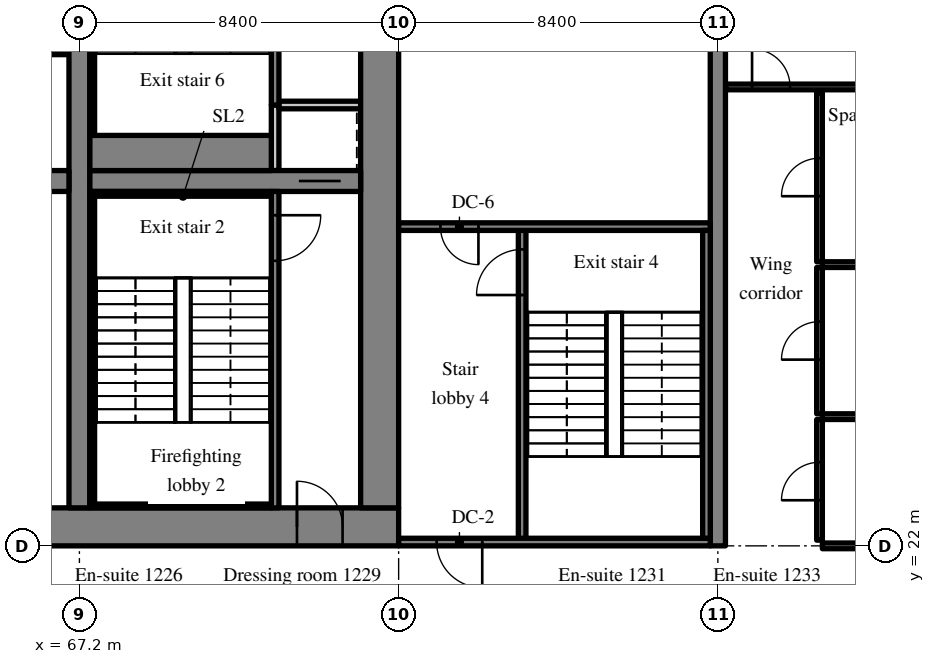
"""IFC4 building model, lengths in metres.
Left out: names, types, materials, properties, quantities, classifications, styles, units other than length and angle.
Written with IfcOpenShell. Run it as: python <this file> out.ifc"""

import sys

from ifc_helpers import new_model, si_unit, direction, frame, frame_2d, origin, place, context, subcontext, project, spatial, rectangle, extrude, source, transform, mapped, element, fill, save


model = new_model("IFC4")
c1 = context("Model", 3, precision=1e-05, world=origin(), true_north=direction((0.0, 1.0)))
c2 = subcontext(c1, "Body", "Model", "MODEL_VIEW")
j1 = project(units=[si_unit("LENGTHUNIT", "METRE"), si_unit("PLANEANGLEUNIT", "RADIAN")], contexts=[c1])
p1 = place(None, origin())
s1 = spatial("IfcSite", under=j1, at=p1, CompositionType="ELEMENT")
p2 = place(p1, origin())
s2 = spatial("IfcBuilding", under=s1, at=p2, CompositionType="ELEMENT")
p3 = place(p2, frame((0.0, 0.0, 54.4)))
s3 = spatial("IfcBuildingStorey", under=s2, at=p3, CompositionType="ELEMENT", Elevation=54.4)
m1 = source(origin(), c2, "Body", "SweptSolid", [
    extrude(rectangle(XDim=50.4, YDim=1.0, at=frame_2d((25.2, 0.0))), origin(), (0.0, 0.0, 1.0), 3.52),
])
p4 = place(p3, frame((25.2, 22.5, 0.0), z_axis=(0.0, 0.0, 1.0), x_axis=(1.0, 0.0, 0.0)))
e1 = element("IfcWall", 1, at=p4, inside=s3, PredefinedType="SHEAR", context=c2, shape_type="MappedRepresentation", body=[
    mapped(m1, transform((0.0, 0.0, 0.0), scale=1.0)),
])
m2 = source(origin(), c2, "Body", "SweptSolid", [
    extrude(rectangle(XDim=1.8, YDim=2.1, at=frame_2d((0.9, 1.05))), frame((0.0, 0.51, 0.0), z_axis=(0.0, -1.0, 0.0), x_axis=(1.0, 0.0, 0.0)), (0.0, 0.0, 1.0), 1.02),
])
p5 = place(p4, frame((15.9, 0.0, 0.0)))
e2 = element("IfcOpeningElement", 2, at=p5, cuts=e1, PredefinedType="OPENING", context=c2, shape_type="MappedRepresentation", body=[
    mapped(m2, transform((0.0, 0.0, 0.0), scale=1.0)),
])
m3 = source(origin(), c2, "Body", "SweptSolid", [
    extrude(rectangle(XDim=1.2, YDim=2.1, at=frame_2d((0.6, 1.05))), frame((0.0, 0.51, 0.0), z_axis=(0.0, -1.0, 0.0), x_axis=(1.0, 0.0, 0.0)), (0.0, 0.0, 1.0), 1.02),
])
p6 = place(p4, frame((26.987, 0.0, 0.0)))
e3 = element("IfcOpeningElement", 3, at=p6, cuts=e1, PredefinedType="OPENING", context=c2, shape_type="MappedRepresentation", body=[
    mapped(m3, transform((0.0, 0.0, 0.0), scale=1.0)),
])
m4 = source(origin(), c2, "Body", "SweptSolid", [
    extrude(rectangle(XDim=0.9, YDim=2.1, at=frame_2d((0.45, 1.05))), frame((0.0, 0.51, 0.0), z_axis=(0.0, -1.0, 0.0), x_axis=(1.0, 0.0, 0.0)), (0.0, 0.0, 1.0), 1.02),
])
p7 = place(p4, frame((33.75, 0.0, 0.0)))
e4 = element("IfcOpeningElement", 4, at=p7, cuts=e1, PredefinedType="OPENING", context=c2, shape_type="MappedRepresentation", body=[
    mapped(m4, transform((0.0, 0.0, 0.0), scale=1.0)),
])
p8 = place(p4, frame((30.75, 0.0, 0.0)))
e5 = element("IfcOpeningElement", 5, at=p8, cuts=e1, PredefinedType="OPENING", context=c2, shape_type="MappedRepresentation", body=[
    mapped(m4, transform((0.0, 0.0, 0.0), scale=1.0)),
])
p9 = place(p4, frame((38.262, 0.0, 0.0)))
e6 = element("IfcOpeningElement", 6, at=p9, cuts=e1, PredefinedType="OPENING", context=c2, shape_type="MappedRepresentation", body=[
    mapped(m4, transform((0.0, 0.0, 0.0), scale=1.0)),
])
p10 = place(p4, frame((6.438, 0.0, 0.0)))
e7 = element("IfcOpeningElement", 7, at=p10, cuts=e1, PredefinedType="OPENING", context=c2, shape_type="MappedRepresentation", body=[
    mapped(m3, transform((0.0, 0.0, 0.0), scale=1.0)),
])
p11 = place(p4, frame((47.725, 0.0, 0.0)))
e8 = element("IfcOpeningElement", 8, at=p11, cuts=e1, PredefinedType="OPENING", context=c2, shape_type="MappedRepresentation", body=[
    mapped(m3, transform((0.0, 0.0, 0.0), scale=1.0)),
])
m5 = source(origin(), c2, "Body", "SweptSolid", [
    extrude(rectangle(XDim=18.0, YDim=1.0, at=frame_2d((9.0, 0.0))), origin(), (0.0, 0.0, 1.0), 3.52),
])
p12 = place(p3, frame((75.1, 23.0, 0.0), z_axis=(0.0, 0.0, 1.0), x_axis=(0.0, 1.0, 0.0)))
e9 = element("IfcWall", 9, at=p12, inside=s3, PredefinedType="SHEAR", context=c2, shape_type="MappedRepresentation", body=[
    mapped(m5, transform((0.0, 0.0, 0.0), scale=1.0)),
])
p13 = place(p12, frame((12.4, 0.0, 0.0)))
e10 = element("IfcOpeningElement", 10, at=p13, cuts=e9, PredefinedType="OPENING", context=c2, shape_type="MappedRepresentation", body=[
    mapped(m3, transform((0.0, 0.0, 0.0), scale=1.0)),
])
m6 = source(origin(), c2, "Body", "SweptSolid", [
    extrude(rectangle(XDim=18.0, YDim=0.55, at=frame_2d((9.0, 0.0))), origin(), (0.0, 0.0, 1.0), 3.52),
])
p14 = place(p3, frame((67.2, 23.0, 0.0), z_axis=(0.0, 0.0, 1.0), x_axis=(0.0, 1.0, 0.0)))
e11 = element("IfcWall", 11, at=p14, inside=s3, PredefinedType="SHEAR", context=c2, shape_type="MappedRepresentation", body=[
    mapped(m6, transform((0.0, 0.0, 0.0), scale=1.0)),
])
m7 = source(origin(), c2, "Body", "SweptSolid", [
    extrude(rectangle(XDim=16.25, YDim=0.55, at=frame_2d((8.125, 0.0))), origin(), (0.0, 0.0, 1.0), 3.52),
])
p15 = place(p3, frame((50.675, 31.6, 0.0), z_axis=(0.0, 0.0, 1.0), x_axis=(1.0, 0.0, 0.0)))
e12 = element("IfcWall", 12, at=p15, inside=s3, PredefinedType="SHEAR", context=c2, shape_type="MappedRepresentation", body=[
    mapped(m7, transform((0.0, 0.0, 0.0), scale=1.0)),
])
m8 = source(origin(), c2, "Body", "SweptSolid", [
    extrude(rectangle(XDim=1.0, YDim=2.1, at=frame_2d((0.5, 1.05))), frame((0.0, 0.285, 0.0), z_axis=(0.0, -1.0, 0.0), x_axis=(1.0, 0.0, 0.0)), (0.0, 0.0, 1.0), 0.57),
])
p16 = place(p15, frame((0.562, 0.0, 0.0)))
e13 = element("IfcOpeningElement", 13, at=p16, cuts=e12, PredefinedType="OPENING", context=c2, shape_type="MappedRepresentation", body=[
    mapped(m8, transform((0.0, 0.0, 0.0), scale=1.0)),
])
m9 = source(origin(), c2, "Body", "SweptSolid", [
    extrude(rectangle(XDim=7.125, YDim=0.55, at=frame_2d((3.562, 0.0))), origin(), (0.0, 0.0, 1.0), 3.52),
])
p17 = place(p3, frame((67.475, 31.6, 0.0), z_axis=(0.0, 0.0, 1.0), x_axis=(1.0, 0.0, 0.0)))
e14 = element("IfcWall", 14, at=p17, inside=s3, PredefinedType="SHEAR", context=c2, shape_type="MappedRepresentation", body=[
    mapped(m9, transform((0.0, 0.0, 0.0), scale=1.0)),
])
m10 = source(origin(), c2, "Body", "SweptSolid", [
    extrude(rectangle(XDim=1.1, YDim=2.1, at=frame_2d((0.55, 1.05))), frame((0.0, 0.285, 0.0), z_axis=(0.0, -1.0, 0.0), x_axis=(1.0, 0.0, 0.0)), (0.0, 0.0, 1.0), 0.57),
])
p18 = place(p17, frame((5.5, 0.0, 0.0)))
e15 = element("IfcOpeningElement", 15, at=p18, cuts=e14, PredefinedType="OPENING", context=c2, shape_type="MappedRepresentation", body=[
    mapped(m10, transform((0.0, 0.0, 0.0), scale=1.0)),
])
m11 = source(origin(), c2, "Body", "SweptSolid", [
    extrude(rectangle(XDim=20.0, YDim=0.4, at=frame_2d((10.0, 0.0))), origin(), (0.0, 0.0, 1.0), 3.52),
])
p19 = place(p3, frame((84.0, 22.0, 0.0), z_axis=(0.0, 0.0, 1.0), x_axis=(0.0, 1.0, 0.0)))
e16 = element("IfcWall", 16, at=p19, inside=s3, PredefinedType="SHEAR", context=c2, shape_type="MappedRepresentation", body=[
    mapped(m11, transform((0.0, 0.0, 0.0), scale=1.0)),
])
m12 = source(origin(), c2, "Body", "SweptSolid", [
    extrude(rectangle(XDim=14.125, YDim=0.15, at=frame_2d((7.062, 0.0))), origin(), (0.0, 0.0, 1.0), 3.52),
])
p20 = place(p3, frame((66.925, 35.0, 0.0), z_axis=(0.0, 0.0, 1.0), x_axis=(-1.0, 0.0, 0.0)))
e17 = element("IfcWall", 17, at=p20, inside=s3, PredefinedType="PARTITIONING", context=c2, shape_type="MappedRepresentation", body=[
    mapped(m12, transform((0.0, 0.0, 0.0), scale=1.0)),
])
m13 = source(origin(), c2, "Body", "SweptSolid", [
    extrude(rectangle(XDim=0.9, YDim=2.1, at=frame_2d((0.45, 1.05))), frame((0.0, 0.085, 0.0), z_axis=(0.0, -1.0, 0.0), x_axis=(1.0, 0.0, 0.0)), (0.0, 0.0, 1.0), 0.17),
])
p21 = place(p20, frame((3.414, 0.0, 0.0)))
e18 = element("IfcOpeningElement", 18, at=p21, cuts=e17, PredefinedType="OPENING", context=c2, shape_type="MappedRepresentation", body=[
    mapped(m13, transform((0.0, 0.0, 0.0), scale=1.0)),
])
p22 = place(p20, frame((10.439, 0.0, 0.0)))
e19 = element("IfcOpeningElement", 19, at=p22, cuts=e17, PredefinedType="OPENING", context=c2, shape_type="MappedRepresentation", body=[
    mapped(m13, transform((0.0, 0.0, 0.0), scale=1.0)),
])
m14 = source(origin(), c2, "Body", "SweptSolid", [
    extrude(rectangle(XDim=8.325, YDim=0.2, at=frame_2d((4.163, 0.0))), origin(), (0.0, 0.0, 1.0), 3.52),
])
p23 = place(p3, frame((72.35, 23.0, 0.0), z_axis=(0.0, 0.0, 1.0), x_axis=(0.0, 1.0, 0.0)))
e20 = element("IfcWall", 20, at=p23, inside=s3, PredefinedType="SOLIDWALL", context=c2, shape_type="MappedRepresentation", body=[
    mapped(m14, transform((0.0, 0.0, 0.0), scale=1.0)),
])
m15 = source(origin(), c2, "Body", "SweptSolid", [
    extrude(rectangle(XDim=1.2, YDim=2.1, at=frame_2d((0.6, 1.05))), frame((0.0, 0.11, 0.0), z_axis=(0.0, -1.0, 0.0), x_axis=(1.0, 0.0, 0.0)), (0.0, 0.0, 1.0), 0.22),
])
p24 = place(p23, frame((6.5, 0.0, 0.0)))
e21 = element("IfcOpeningElement", 21, at=p24, cuts=e20, PredefinedType="OPENING", context=c2, shape_type="MappedRepresentation", body=[
    mapped(m15, transform((0.0, 0.0, 0.0), scale=1.0)),
])
m16 = source(origin(), c2, "Body", "SweptSolid", [
    extrude(rectangle(XDim=1.725, YDim=0.2, at=frame_2d((0.863, 0.0))), origin(), (0.0, 0.0, 1.0), 3.52),
])
p25 = place(p3, frame((72.35, 31.875, 0.0), z_axis=(0.0, 0.0, 1.0), x_axis=(0.0, 1.0, 0.0)))
e22 = element("IfcWall", 22, at=p25, inside=s3, PredefinedType="SOLIDWALL", context=c2, shape_type="MappedRepresentation", body=[
    mapped(m16, transform((0.0, 0.0, 0.0), scale=1.0)),
])
m17 = source(origin(), c2, "Body", "SweptSolid", [
    extrude(rectangle(XDim=2.15, YDim=0.2, at=frame_2d((1.075, 0.0))), origin(), (0.0, 0.0, 1.0), 3.52),
])
p26 = place(p3, frame((72.45, 33.6, 0.0), z_axis=(0.0, 0.0, 1.0), x_axis=(1.0, 0.0, 0.0)))
e23 = element("IfcWall", 23, at=p26, inside=s3, PredefinedType="SOLIDWALL", context=c2, shape_type="MappedRepresentation", body=[
    mapped(m17, transform((0.0, 0.0, 0.0), scale=1.0)),
])
m18 = source(origin(), c2, "Body", "SweptSolid", [
    extrude(rectangle(XDim=7.4, YDim=0.2, at=frame_2d((3.7, 0.0))), origin(), (0.0, 0.0, 1.0), 3.52),
])
p27 = place(p3, frame((72.35, 33.6, 0.0), z_axis=(0.0, 0.0, 1.0), x_axis=(0.0, 1.0, 0.0)))
e24 = element("IfcWall", 24, at=p27, inside=s3, PredefinedType="SOLIDWALL", context=c2, shape_type="MappedRepresentation", body=[
    mapped(m18, transform((0.0, 0.0, 0.0), scale=1.0)),
])
m19 = source(origin(), c2, "Body", "SweptSolid", [
    extrude(rectangle(XDim=1.8, YDim=2.1, at=frame_2d((0.9, 1.05))), frame((0.0, 0.11, 0.0), z_axis=(0.0, -1.0, 0.0), x_axis=(1.0, 0.0, 0.0)), (0.0, 0.0, 1.0), 0.22),
])
p28 = place(p27, frame((5.3, 0.0, 0.0)))
e25 = element("IfcOpeningElement", 25, at=p28, cuts=e24, PredefinedType="OPENING", context=c2, shape_type="MappedRepresentation", body=[
    mapped(m19, transform((0.0, 0.0, 0.0), scale=1.0)),
])
m20 = source(origin(), c2, "Body", "SweptSolid", [
    extrude(rectangle(XDim=8.3, YDim=0.2, at=frame_2d((4.15, 0.0))), origin(), (0.0, 0.0, 1.0), 3.52),
])
p29 = place(p3, frame((78.85, 22.1, 0.0), z_axis=(0.0, 0.0, 1.0), x_axis=(0.0, 1.0, 0.0)))
e26 = element("IfcWall", 26, at=p29, inside=s3, PredefinedType="SOLIDWALL", context=c2, shape_type="MappedRepresentation", body=[
    mapped(m20, transform((0.0, 0.0, 0.0), scale=1.0)),
])
p30 = place(p29, frame((6.5, 0.0, 0.0)))
e27 = element("IfcOpeningElement", 27, at=p30, cuts=e26, PredefinedType="OPENING", context=c2, shape_type="MappedRepresentation", body=[
    mapped(m15, transform((0.0, 0.0, 0.0), scale=1.0)),
])
m21 = source(origin(), c2, "Body", "SweptSolid", [
    extrude(rectangle(XDim=8.2, YDim=0.2, at=frame_2d((4.1, 0.0))), origin(), (0.0, 0.0, 1.0), 3.52),
])
p31 = place(p3, frame((83.8, 22.1, 0.0), z_axis=(0.0, 0.0, 1.0), x_axis=(-1.0, 0.0, 0.0)))
e28 = element("IfcWall", 28, at=p31, inside=s3, PredefinedType="SOLIDWALL", context=c2, shape_type="MappedRepresentation", body=[
    mapped(m21, transform((0.0, 0.0, 0.0), scale=1.0)),
])
p32 = place(p31, frame((6.0, 0.0, 0.0)))
e29 = element("IfcOpeningElement", 29, at=p32, cuts=e28, PredefinedType="OPENING", context=c2, shape_type="MappedRepresentation", body=[
    mapped(m15, transform((0.0, 0.0, 0.0), scale=1.0)),
])
p33 = place(p3, frame((83.8, 30.4, 0.0), z_axis=(0.0, 0.0, 1.0), x_axis=(-1.0, 0.0, 0.0)))
e30 = element("IfcWall", 30, at=p33, inside=s3, PredefinedType="SOLIDWALL", context=c2, shape_type="MappedRepresentation", body=[
    mapped(m21, transform((0.0, 0.0, 0.0), scale=1.0)),
])
m22 = source(origin(), c2, "Body", "SweptSolid", [
    extrude(rectangle(XDim=1.0, YDim=2.1, at=frame_2d((0.5, 1.05))), frame((0.0, 0.11, 0.0), z_axis=(0.0, -1.0, 0.0), x_axis=(1.0, 0.0, 0.0)), (0.0, 0.0, 1.0), 0.22),
])
p34 = place(p33, frame((6.1, 0.0, 0.0)))
e31 = element("IfcOpeningElement", 31, at=p34, cuts=e30, PredefinedType="OPENING", context=c2, shape_type="MappedRepresentation", body=[
    mapped(m22, transform((0.0, 0.0, 0.0), scale=1.0)),
])
m23 = source(origin(), c2, "Body", "SweptSolid", [
    extrude(rectangle(XDim=4.775, YDim=0.1, at=frame_2d((2.387, 0.0))), origin(), (0.0, 0.0, 1.0), 3.52),
])
p35 = place(p3, frame((67.475, 23.05, 0.0), z_axis=(0.0, 0.0, 1.0), x_axis=(1.0, 0.0, 0.0)))
e32 = element("IfcWall", 32, at=p35, inside=s3, PredefinedType="SOLIDWALL", context=c2, shape_type="MappedRepresentation", body=[
    mapped(m23, transform((0.0, 0.0, 0.0), scale=1.0)),
])
m24 = source(origin(), c2, "Body", "SweptSolid", [
    extrude(rectangle(XDim=4.775, YDim=0.125, at=frame_2d((2.387, 0.0))), origin(), (0.0, 0.0, 1.0), 3.52),
])
p36 = place(p3, frame((67.475, 31.262, 0.0), z_axis=(0.0, 0.0, 1.0), x_axis=(1.0, 0.0, 0.0)))
e33 = element("IfcWall", 33, at=p36, inside=s3, PredefinedType="SOLIDWALL", context=c2, shape_type="MappedRepresentation", body=[
    mapped(m24, transform((0.0, 0.0, 0.0), scale=1.0)),
])
m25 = source(origin(), c2, "Body", "SweptSolid", [
    extrude(rectangle(XDim=8.1, YDim=0.125, at=frame_2d((4.05, 0.0))), origin(), (0.0, 0.0, 1.0), 3.52),
])
p37 = place(p3, frame((67.537, 23.1, 0.0), z_axis=(0.0, 0.0, 1.0), x_axis=(0.0, 1.0, 0.0)))
e34 = element("IfcWall", 34, at=p37, inside=s3, PredefinedType="SOLIDWALL", context=c2, shape_type="MappedRepresentation", body=[
    mapped(m25, transform((0.0, 0.0, 0.0), scale=1.0)),
])
m26 = source(origin(), c2, "Body", "SweptSolid", [
    extrude(rectangle(XDim=4.775, YDim=0.925, at=frame_2d((2.387, 0.0))), origin(), (0.0, 0.0, 1.0), 3.52),
])
p38 = place(p3, frame((67.475, 32.337, 0.0), z_axis=(0.0, 0.0, 1.0), x_axis=(1.0, 0.0, 0.0)))
e35 = element("IfcWall", 35, at=p38, inside=s3, PredefinedType="SOLIDWALL", context=c2, shape_type="MappedRepresentation", body=[
    mapped(m26, transform((0.0, 0.0, 0.0), scale=1.0)),
])
p39 = place(p3, frame((67.537, 32.8, 0.0), z_axis=(0.0, 0.0, 1.0), x_axis=(0.0, 1.0, 0.0)))
e36 = element("IfcWall", 36, at=p39, inside=s3, PredefinedType="SOLIDWALL", context=c2, shape_type="MappedRepresentation", body=[
    mapped(m25, transform((0.0, 0.0, 0.0), scale=1.0)),
])
m27 = source(origin(), c2, "Body", "SweptSolid", [
    extrude(rectangle(XDim=8.1, YDim=0.2, at=frame_2d((4.05, 0.0))), origin(), (0.0, 0.0, 1.0), 3.52),
])
p40 = place(p3, frame((83.7, 22.2, 0.0), z_axis=(0.0, 0.0, 1.0), x_axis=(0.0, 1.0, 0.0)))
e37 = element("IfcWall", 37, at=p40, inside=s3, PredefinedType="SOLIDWALL", context=c2, shape_type="MappedRepresentation", body=[
    mapped(m27, transform((0.0, 0.0, 0.0), scale=1.0)),
])
m28 = source(origin(), c2, "Body", "SweptSolid", [
    extrude(rectangle(XDim=5.45, YDim=0.15, at=frame_2d((2.725, 0.0))), origin(), (0.0, 0.0, 1.0), 2.82),
])
p41 = place(p3, frame((86.75, 22.0, 0.0), z_axis=(0.0, 0.0, 1.0), x_axis=(1.0, 0.0, 0.0)))
e38 = element("IfcWall", 38, at=p41, inside=s3, PredefinedType="PARTITIONING", context=c2, shape_type="MappedRepresentation", body=[
    mapped(m28, transform((0.0, 0.0, 0.0), scale=1.0)),
])
m29 = source(origin(), c2, "Body", "SweptSolid", [
    extrude(rectangle(XDim=3.175, YDim=0.15, at=frame_2d((1.587, 0.0))), origin(), (0.0, 0.0, 1.0), 3.52),
])
p42 = place(p3, frame((86.675, 22.15, 0.0), z_axis=(0.0, 0.0, 1.0), x_axis=(0.0, 1.0, 0.0)))
e39 = element("IfcWall", 39, at=p42, inside=s3, PredefinedType="PARTITIONING", context=c2, shape_type="MappedRepresentation", body=[
    mapped(m29, transform((0.0, 0.0, 0.0), scale=1.0)),
])
m30 = source(origin(), c2, "Body", "SweptSolid", [
    extrude(rectangle(XDim=1.0, YDim=2.1, at=frame_2d((0.5, 1.05))), frame((0.0, 0.085, 0.0), z_axis=(0.0, -1.0, 0.0), x_axis=(1.0, 0.0, 0.0)), (0.0, 0.0, 1.0), 0.17),
])
p43 = place(p42, frame((1.05, 0.0, 0.0)))
e40 = element("IfcOpeningElement", 40, at=p43, cuts=e39, PredefinedType="OPENING", context=c2, shape_type="MappedRepresentation", body=[
    mapped(m30, transform((0.0, 0.0, 0.0), scale=1.0)),
])
m31 = source(origin(), c2, "Body", "SweptSolid", [
    extrude(rectangle(XDim=5.45, YDim=0.15, at=frame_2d((2.725, 0.0))), origin(), (0.0, 0.0, 1.0), 3.52),
])
p44 = place(p3, frame((86.75, 25.4, 0.0), z_axis=(0.0, 0.0, 1.0), x_axis=(1.0, 0.0, 0.0)))
e41 = element("IfcWall", 41, at=p44, inside=s3, PredefinedType="PARTITIONING", context=c2, shape_type="MappedRepresentation", body=[
    mapped(m31, transform((0.0, 0.0, 0.0), scale=1.0)),
])
m32 = source(origin(), c2, "Body", "SweptSolid", [
    extrude(rectangle(XDim=3.85, YDim=0.15, at=frame_2d((1.925, 0.0))), origin(), (0.0, 0.0, 1.0), 3.52),
])
p45 = place(p3, frame((86.675, 25.475, 0.0), z_axis=(0.0, 0.0, 1.0), x_axis=(0.0, 1.0, 0.0)))
e42 = element("IfcWall", 42, at=p45, inside=s3, PredefinedType="PARTITIONING", context=c2, shape_type="MappedRepresentation", body=[
    mapped(m32, transform((0.0, 0.0, 0.0), scale=1.0)),
])
p46 = place(p45, frame((1.425, 0.0, 0.0)))
e43 = element("IfcOpeningElement", 43, at=p46, cuts=e42, PredefinedType="OPENING", context=c2, shape_type="MappedRepresentation", body=[
    mapped(m30, transform((0.0, 0.0, 0.0), scale=1.0)),
])
p47 = place(p3, frame((86.75, 29.4, 0.0), z_axis=(0.0, 0.0, 1.0), x_axis=(1.0, 0.0, 0.0)))
e44 = element("IfcWall", 44, at=p47, inside=s3, PredefinedType="PARTITIONING", context=c2, shape_type="MappedRepresentation", body=[
    mapped(m31, transform((0.0, 0.0, 0.0), scale=1.0)),
])
m33 = source(origin(), c2, "Body", "SweptSolid", [
    extrude(rectangle(XDim=4.45, YDim=0.15, at=frame_2d((2.225, 0.0))), origin(), (0.0, 0.0, 1.0), 3.52),
])
p48 = place(p3, frame((86.675, 29.475, 0.0), z_axis=(0.0, 0.0, 1.0), x_axis=(0.0, 1.0, 0.0)))
e45 = element("IfcWall", 45, at=p48, inside=s3, PredefinedType="PARTITIONING", context=c2, shape_type="MappedRepresentation", body=[
    mapped(m33, transform((0.0, 0.0, 0.0), scale=1.0)),
])
p49 = place(p48, frame((1.725, 0.0, 0.0)))
e46 = element("IfcOpeningElement", 46, at=p49, cuts=e45, PredefinedType="OPENING", context=c2, shape_type="MappedRepresentation", body=[
    mapped(m30, transform((0.0, 0.0, 0.0), scale=1.0)),
])
m34 = source(origin(), c2, "Body", "SweptSolid", [
    extrude(rectangle(XDim=8.0, YDim=0.15, at=frame_2d((4.0, 0.0))), origin(), (0.0, 0.0, 1.0), 3.52),
])
p50 = place(p3, frame((84.2, 34.075, 0.0), z_axis=(0.0, 0.0, 1.0), x_axis=(1.0, 0.0, 0.0)))
e47 = element("IfcWall", 47, at=p50, inside=s3, PredefinedType="PARTITIONING", context=c2, shape_type="MappedRepresentation", body=[
    mapped(m34, transform((0.0, 0.0, 0.0), scale=1.0)),
])
p51 = place(p50, frame((0.7, 0.0, 0.0)))
e48 = element("IfcOpeningElement", 48, at=p51, cuts=e47, PredefinedType="OPENING", context=c2, shape_type="MappedRepresentation", body=[
    mapped(m30, transform((0.0, 0.0, 0.0), scale=1.0)),
])
m35 = source(origin(), c2, "Body", "SweptSolid", [
    extrude(rectangle(XDim=1.2, YDim=2.1, at=frame_2d((0.6, 1.05))), frame((0.0, 0.025, 0.0), z_axis=(0.0, -1.0, 0.0), x_axis=(1.0, 0.0, 0.0)), (0.0, 0.0, 1.0), 0.05),
])
p52 = place(p24, origin())
e49 = element("IfcDoor", 49, at=p52, inside=s3, OperationType="SINGLE_SWING_RIGHT", PredefinedType="DOOR", context=c2, shape_type="MappedRepresentation", body=[
    mapped(m35, transform((0.0, 0.0, 0.0), scale=1.0)),
])
fill(e21, e49)
m36 = source(origin(), c2, "Body", "SweptSolid", [
    extrude(rectangle(XDim=1.2, YDim=2.1, at=frame_2d((0.6, 1.05))), frame((0.0, 0.375, 0.0), z_axis=(0.0, -1.0, 0.0), x_axis=(1.0, 0.0, 0.0)), (0.0, 0.0, 1.0), 0.05),
])
p53 = place(p11, origin())
e50 = element("IfcDoor", 50, at=p53, inside=s3, OperationType="SINGLE_SWING_LEFT", PredefinedType="DOOR", context=c2, shape_type="MappedRepresentation", body=[
    mapped(m36, transform((0.0, 0.0, 0.0), scale=1.0)),
])
fill(e8, e50)
m37 = source(origin(), c2, "Body", "SweptSolid", [
    extrude(rectangle(XDim=1.1, YDim=2.1, at=frame_2d((0.55, 1.05))), frame((0.0, 0.025, 0.0), z_axis=(0.0, -1.0, 0.0), x_axis=(1.0, 0.0, 0.0)), (0.0, 0.0, 1.0), 0.05),
])
p54 = place(p18, origin())
e51 = element("IfcDoor", 51, at=p54, inside=s3, OperationType="SLIDING_TO_LEFT", PredefinedType="DOOR", context=c2, shape_type="MappedRepresentation", body=[
    mapped(m37, transform((0.0, 0.0, 0.0), scale=1.0)),
])
fill(e15, e51)
p55 = place(p30, origin())
e52 = element("IfcDoor", 52, at=p55, inside=s3, OperationType="SINGLE_SWING_LEFT", PredefinedType="DOOR", context=c2, shape_type="MappedRepresentation", body=[
    mapped(m35, transform((0.0, 0.0, 0.0), scale=1.0)),
])
fill(e27, e52)
p56 = place(p32, origin())
e53 = element("IfcDoor", 53, at=p56, inside=s3, OperationType="SINGLE_SWING_LEFT", PredefinedType="DOOR", context=c2, shape_type="MappedRepresentation", body=[
    mapped(m35, transform((0.0, 0.0, 0.0), scale=1.0)),
])
fill(e29, e53)
m38 = source(origin(), c2, "Body", "SweptSolid", [
    extrude(rectangle(XDim=1.0, YDim=2.1, at=frame_2d((0.5, 1.05))), frame((0.0, 0.025, 0.0), z_axis=(0.0, -1.0, 0.0), x_axis=(1.0, 0.0, 0.0)), (0.0, 0.0, 1.0), 0.05),
])
p57 = place(p34, origin())
e54 = element("IfcDoor", 54, at=p57, inside=s3, OperationType="SINGLE_SWING_LEFT", PredefinedType="DOOR", context=c2, shape_type="MappedRepresentation", body=[
    mapped(m38, transform((0.0, 0.0, 0.0), scale=1.0)),
])
fill(e31, e54)
p58 = place(p43, origin())
e55 = element("IfcDoor", 55, at=p58, inside=s3, OperationType="SINGLE_SWING_LEFT", PredefinedType="DOOR", context=c2, shape_type="MappedRepresentation", body=[
    mapped(m38, transform((0.0, 0.0, 0.0), scale=1.0)),
])
fill(e40, e55)
p59 = place(p46, origin())
e56 = element("IfcDoor", 56, at=p59, inside=s3, OperationType="SINGLE_SWING_LEFT", PredefinedType="DOOR", context=c2, shape_type="MappedRepresentation", body=[
    mapped(m38, transform((0.0, 0.0, 0.0), scale=1.0)),
])
fill(e43, e56)
p60 = place(p49, origin())
e57 = element("IfcDoor", 57, at=p60, inside=s3, OperationType="SINGLE_SWING_LEFT", PredefinedType="DOOR", context=c2, shape_type="MappedRepresentation", body=[
    mapped(m38, transform((0.0, 0.0, 0.0), scale=1.0)),
])
fill(e46, e57)
p61 = place(p51, origin())
e58 = element("IfcDoor", 58, at=p61, inside=s3, OperationType="SINGLE_SWING_LEFT", PredefinedType="DOOR", context=c2, shape_type="MappedRepresentation", body=[
    mapped(m38, transform((0.0, 0.0, 0.0), scale=1.0)),
])
fill(e48, e58)
save(model, sys.argv[1])
